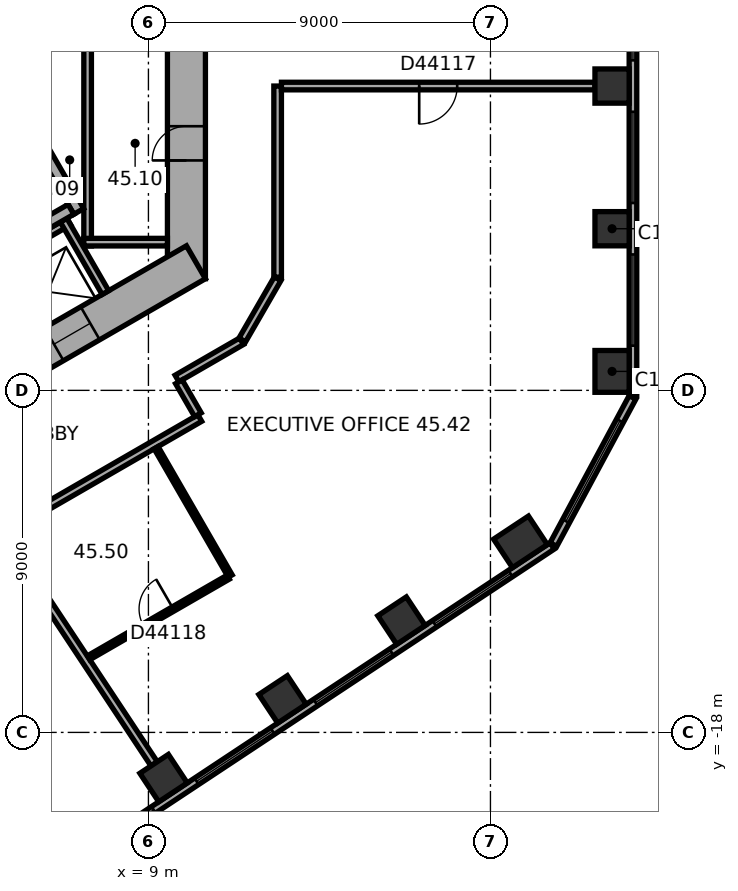
"""IFC4 building model, lengths in metres.
Left out: names, types, materials, properties, quantities, classifications, styles, units other than length and angle.
Written with IfcOpenShell. Run it as: python <this file> out.ifc"""

import sys

from ifc_helpers import new_model, si_unit, direction, frame, frame_2d, origin, origin_2d, place, context, subcontext, project, spatial, rectangle, extrude, element, fill, save


model = new_model("IFC4")
c1 = context("Model", 3, precision=1e-05, world=origin(), true_north=direction((0.0, 1.0)))
c2 = subcontext(c1, "Body", "Model", "MODEL_VIEW")
j1 = project(units=[si_unit("LENGTHUNIT", "METRE"), si_unit("PLANEANGLEUNIT", "RADIAN")], contexts=[c1])
p1 = place(None, origin())
s1 = spatial("IfcSite", under=j1, at=p1, CompositionType="ELEMENT")
p2 = place(p1, origin())
s2 = spatial("IfcBuilding", under=s1, at=p2, CompositionType="ELEMENT")
p3 = place(p2, frame((0.0, 0.0, 183.6)))
s3 = spatial("IfcBuildingStorey", under=s2, at=p3, CompositionType="ELEMENT", Elevation=183.6)
p4 = place(p3, frame((21.2, -8.501, 0.0), z_axis=(0.0, 0.0, 1.0), x_axis=(0.0, 1.0, 0.0)))
e1 = element("IfcColumn", 1, at=p4, inside=s3, PredefinedType="COLUMN", context=c2, shape_type="SweptSolid", body=[
    extrude(rectangle(XDim=1.1, YDim=0.9, at=origin_2d()), origin(), (0.0, 0.0, 1.0), 3.7),
])
for number, where, z_axis, x_axis in (
    (2, (21.2, -4.747, 0.0), (0.0, 0.0, 1.0), (0.0, 1.0, 0.0)),
    (3, (21.2, -0.993, 0.0), (0.0, 0.0, 1.0), (0.0, 1.0, 0.0)),
    (4, (9.398, -19.202, 0.0), (0.0, 0.0, 1.0), (0.834, 0.552, 0.0)),
    (5, (12.529, -17.13, 0.0), (0.0, 0.0, 1.0), (0.834, 0.552, 0.0)),
    (6, (15.659, -15.058, 0.0), (0.0, 0.0, 1.0), (0.834, 0.552, 0.0)),
):
    element("IfcColumn", number, at=place(p3, frame(where, z_axis=z_axis, x_axis=x_axis)), inside=s3, PredefinedType="COLUMN", context=c2, shape_type="SweptSolid", body=[
        extrude(rectangle(XDim=0.9, YDim=0.9, at=origin_2d()), origin(), (0.0, 0.0, 1.0), 3.7),
    ])
p5 = place(p3, frame((18.79, -12.986, 0.0), z_axis=(0.0, 0.0, 1.0), x_axis=(0.833885822067, 0.551936985312, 0.0)))
e7 = element("IfcColumn", 7, at=p5, inside=s3, PredefinedType="COLUMN", context=c2, shape_type="SweptSolid", body=[
    extrude(rectangle(XDim=1.1, YDim=0.9, at=origin_2d()), origin(), (0.0, 0.0, 1.0), 3.7),
])
p6 = place(p3, frame((10.0, -6.062, 0.0), z_axis=(0.0, 0.0, 1.0), x_axis=(0.0, 1.0, 0.0)))
e8 = element("IfcWall", 8, at=p6, inside=s3, PredefinedType="SHEAR", context=c2, shape_type="SweptSolid", body=[
    extrude(rectangle(XDim=12.125, YDim=1.0, at=frame_2d((6.062, 0.0))), origin(), (0.0, 0.0, 1.0), 3.7),
])
p7 = place(p6, frame((6.262, 0.0, 0.0)))
e9 = element("IfcOpeningElement", 9, at=p7, cuts=e8, PredefinedType="OPENING", context=c2, shape_type="SweptSolid", body=[
    extrude(rectangle(XDim=1.5, YDim=2.1, at=frame_2d((0.75, 1.05))), frame((0.0, 0.51, 0.0), z_axis=(0.0, -1.0, 0.0), x_axis=(1.0, 0.0, 0.0)), (0.0, 0.0, 1.0), 1.02),
])
p8 = place(p6, frame((3.112, 0.0, 0.0)))
e10 = element("IfcOpeningElement", 10, at=p8, cuts=e8, PredefinedType="OPENING", context=c2, shape_type="SweptSolid", body=[
    extrude(rectangle(XDim=0.9, YDim=2.1, at=frame_2d((0.45, 1.05))), frame((0.0, 0.51, 0.0), z_axis=(0.0, -1.0, 0.0), x_axis=(1.0, 0.0, 0.0)), (0.0, 0.0, 1.0), 1.02),
])
p9 = place(p3, frame((-0.25, -11.691, 0.0), z_axis=(0.0, 0.0, 1.0), x_axis=(0.866022616891, 0.50000482701, 0.0)))
e11 = element("IfcWall", 11, at=p9, inside=s3, PredefinedType="SHEAR", context=c2, shape_type="SweptSolid", body=[
    extrude(rectangle(XDim=12.125, YDim=1.0, at=frame_2d((6.062, 0.0))), origin(), (0.0, 0.0, 1.0), 3.7),
])
p10 = place(p9, frame((2.612, 0.0, 0.0)))
e12 = element("IfcOpeningElement", 12, at=p10, cuts=e11, PredefinedType="OPENING", context=c2, shape_type="SweptSolid", body=[
    extrude(rectangle(XDim=1.1, YDim=2.1, at=frame_2d((0.55, 1.05))), frame((0.0, 0.51, 0.0), z_axis=(0.0, -1.0, 0.0), x_axis=(1.0, 0.0, 0.0)), (0.0, 0.0, 1.0), 1.02),
])
p11 = place(p9, frame((5.212, 0.0, 0.0)))
e13 = element("IfcOpeningElement", 13, at=p11, cuts=e11, PredefinedType="OPENING", context=c2, shape_type="SweptSolid", body=[
    extrude(rectangle(XDim=1.1, YDim=2.1, at=frame_2d((0.55, 1.05))), frame((0.0, 0.51, 0.0), z_axis=(0.0, -1.0, 0.0), x_axis=(1.0, 0.0, 0.0)), (0.0, 0.0, 1.0), 1.02),
])
p12 = place(p9, frame((7.812, 0.0, 0.0)))
e14 = element("IfcOpeningElement", 14, at=p12, cuts=e11, PredefinedType="OPENING", context=c2, shape_type="SweptSolid", body=[
    extrude(rectangle(XDim=1.1, YDim=2.1, at=frame_2d((0.55, 1.05))), frame((0.0, 0.51, 0.0), z_axis=(0.0, -1.0, 0.0), x_axis=(1.0, 0.0, 0.0)), (0.0, 0.0, 1.0), 1.02),
])
p13 = place(p3, frame((21.75, -9.138, 0.0), z_axis=(0.0, 0.0, 1.0), x_axis=(0.0, 1.0, 0.0)))
e15 = element("IfcWall", 15, at=p13, inside=s3, PredefinedType="STANDARD", context=c2, shape_type="SweptSolid", body=[
    extrude(rectangle(XDim=20.044, YDim=0.2, at=frame_2d((10.022, 0.0))), origin(), (0.0, 0.0, 1.0), 3.7),
])
p14 = place(p13, frame((1.314, 0.0, 0.9)))
e16 = element("IfcOpeningElement", 16, at=p14, cuts=e15, PredefinedType="OPENING", context=c2, shape_type="SweptSolid", body=[
    extrude(rectangle(XDim=2.4, YDim=2.0, at=frame_2d((1.2, 1.0))), frame((0.0, 0.11, 0.0), z_axis=(0.0, -1.0, 0.0), x_axis=(1.0, 0.0, 0.0)), (0.0, 0.0, 1.0), 0.22),
])
p15 = place(p13, frame((5.069, 0.0, 0.9)))
e17 = element("IfcOpeningElement", 17, at=p15, cuts=e15, PredefinedType="OPENING", context=c2, shape_type="SweptSolid", body=[
    extrude(rectangle(XDim=2.4, YDim=2.0, at=frame_2d((1.2, 1.0))), frame((0.0, 0.11, 0.0), z_axis=(0.0, -1.0, 0.0), x_axis=(1.0, 0.0, 0.0)), (0.0, 0.0, 1.0), 0.22),
])
p16 = place(p13, frame((8.823, 0.0, 0.9)))
e18 = element("IfcOpeningElement", 18, at=p16, cuts=e15, PredefinedType="OPENING", context=c2, shape_type="SweptSolid", body=[
    extrude(rectangle(XDim=2.4, YDim=2.0, at=frame_2d((1.2, 1.0))), frame((0.0, 0.11, 0.0), z_axis=(0.0, -1.0, 0.0), x_axis=(1.0, 0.0, 0.0)), (0.0, 0.0, 1.0), 0.22),
])
p17 = place(p13, frame((12.577, 0.0, 0.9)))
e19 = element("IfcOpeningElement", 19, at=p17, cuts=e15, PredefinedType="OPENING", context=c2, shape_type="SweptSolid", body=[
    extrude(rectangle(XDim=2.4, YDim=2.0, at=frame_2d((1.2, 1.0))), frame((0.0, 0.11, 0.0), z_axis=(0.0, -1.0, 0.0), x_axis=(1.0, 0.0, 0.0)), (0.0, 0.0, 1.0), 0.22),
])
p18 = place(p13, frame((16.331, 0.0, 0.9)))
e20 = element("IfcOpeningElement", 20, at=p18, cuts=e15, PredefinedType="OPENING", context=c2, shape_type="SweptSolid", body=[
    extrude(rectangle(XDim=2.4, YDim=2.0, at=frame_2d((1.2, 1.0))), frame((0.0, 0.11, 0.0), z_axis=(0.0, -1.0, 0.0), x_axis=(1.0, 0.0, 0.0)), (0.0, 0.0, 1.0), 0.22),
])
p19 = place(p3, frame((2.911, -24.156, 0.0), z_axis=(0.0, 0.0, 1.0), x_axis=(0.833882163564, 0.551942512668, 0.0)))
e21 = element("IfcWall", 21, at=p19, inside=s3, PredefinedType="STANDARD", context=c2, shape_type="SweptSolid", body=[
    extrude(rectangle(XDim=20.044, YDim=0.2, at=frame_2d((10.022, 0.0))), origin(), (0.0, 0.0, 1.0), 3.7),
])
p20 = place(p19, frame((1.313, 0.0, 0.9)))
e22 = element("IfcOpeningElement", 22, at=p20, cuts=e21, PredefinedType="OPENING", context=c2, shape_type="SweptSolid", body=[
    extrude(rectangle(XDim=2.4, YDim=2.0, at=frame_2d((1.2, 1.0))), frame((0.0, 0.11, 0.0), z_axis=(0.0, -1.0, 0.0), x_axis=(1.0, 0.0, 0.0)), (0.0, 0.0, 1.0), 0.22),
])
p21 = place(p19, frame((5.067, 0.0, 0.9)))
e23 = element("IfcOpeningElement", 23, at=p21, cuts=e21, PredefinedType="OPENING", context=c2, shape_type="SweptSolid", body=[
    extrude(rectangle(XDim=2.4, YDim=2.0, at=frame_2d((1.2, 1.0))), frame((0.0, 0.11, 0.0), z_axis=(0.0, -1.0, 0.0), x_axis=(1.0, 0.0, 0.0)), (0.0, 0.0, 1.0), 0.22),
])
p22 = place(p19, frame((8.821, 0.0, 0.9)))
e24 = element("IfcOpeningElement", 24, at=p22, cuts=e21, PredefinedType="OPENING", context=c2, shape_type="SweptSolid", body=[
    extrude(rectangle(XDim=2.4, YDim=2.0, at=frame_2d((1.2, 1.0))), frame((0.0, 0.11, 0.0), z_axis=(0.0, -1.0, 0.0), x_axis=(1.0, 0.0, 0.0)), (0.0, 0.0, 1.0), 0.22),
])
p23 = place(p19, frame((12.575, 0.0, 0.9)))
e25 = element("IfcOpeningElement", 25, at=p23, cuts=e21, PredefinedType="OPENING", context=c2, shape_type="SweptSolid", body=[
    extrude(rectangle(XDim=2.4, YDim=2.0, at=frame_2d((1.2, 1.0))), frame((0.0, 0.11, 0.0), z_axis=(0.0, -1.0, 0.0), x_axis=(1.0, 0.0, 0.0)), (0.0, 0.0, 1.0), 0.22),
])
p24 = place(p19, frame((16.329, 0.0, 0.9)))
e26 = element("IfcOpeningElement", 26, at=p24, cuts=e21, PredefinedType="OPENING", context=c2, shape_type="SweptSolid", body=[
    extrude(rectangle(XDim=2.4, YDim=2.0, at=frame_2d((1.2, 1.0))), frame((0.0, 0.11, 0.0), z_axis=(0.0, -1.0, 0.0), x_axis=(1.0, 0.0, 0.0)), (0.0, 0.0, 1.0), 0.22),
])
p25 = place(p3, frame((19.658, -13.057, 0.0), z_axis=(0.0, 0.0, 1.0), x_axis=(0.473307879841, 0.880897071672, 0.0)))
e27 = element("IfcWall", 27, at=p25, inside=s3, PredefinedType="STANDARD", context=c2, shape_type="SweptSolid", body=[
    extrude(rectangle(XDim=4.395, YDim=0.2, at=frame_2d((2.197, 0.0))), origin(), (0.0, 0.0, 1.0), 3.7),
])
p26 = place(p25, frame((0.698, 0.0, 0.9)))
e28 = element("IfcOpeningElement", 28, at=p26, cuts=e27, PredefinedType="OPENING", context=c2, shape_type="SweptSolid", body=[
    extrude(rectangle(XDim=3.0, YDim=2.0, at=frame_2d((1.5, 1.0))), frame((0.0, 0.11, 0.0), z_axis=(0.0, -1.0, 0.0), x_axis=(1.0, 0.0, 0.0)), (0.0, 0.0, 1.0), 0.22),
])
p27 = place(p3, frame((7.4, -5.2, 0.0), z_axis=(0.0, 0.0, 1.0), x_axis=(0.0, 1.0, 0.0)))
e29 = element("IfcWall", 29, at=p27, inside=s3, PredefinedType="PARTITIONING", context=c2, shape_type="SweptSolid", body=[
    extrude(rectangle(XDim=5.4, YDim=0.2, at=frame_2d((2.7, 0.0))), origin(), (0.0, 0.0, 1.0), 3.42),
])
p28 = place(p3, frame((7.3, -5.1, 0.0), z_axis=(0.0, 0.0, 1.0), x_axis=(1.0, 0.0, 0.0)))
e30 = element("IfcWall", 30, at=p28, inside=s3, PredefinedType="PARTITIONING", context=c2, shape_type="SweptSolid", body=[
    extrude(rectangle(XDim=2.2, YDim=0.2, at=frame_2d((1.1, 0.0))), origin(), (0.0, 0.0, 1.0), 3.42),
])
p29 = place(p3, frame((-0.024, -8.559, 0.0), z_axis=(0.0, 0.0, 1.0), x_axis=(0.866026010844, 0.49999894854, 0.0)))
e31 = element("IfcWall", 31, at=p29, inside=s3, PredefinedType="PARTITIONING", context=c2, shape_type="SweptSolid", body=[
    extrude(rectangle(XDim=8.0, YDim=0.2, at=frame_2d((4.0, 0.0))), origin(), (0.0, 0.0, 1.0), 3.42),
])
p30 = place(p3, frame((6.768, -4.522, 0.0), z_axis=(0.0, 0.0, 1.0), x_axis=(0.50002983664, -0.866008176907, 0.0)))
e32 = element("IfcWall", 32, at=p30, inside=s3, PredefinedType="PARTITIONING", context=c2, shape_type="SweptSolid", body=[
    extrude(rectangle(XDim=2.2, YDim=0.2, at=frame_2d((1.1, 0.0))), origin(), (0.0, 0.0, 1.0), 3.42),
])
p31 = place(p3, frame((4.816, -0.222, 0.0), z_axis=(0.0, 0.0, 1.0), x_axis=(0.499977259774, -0.866038532462, 0.0)))
e33 = element("IfcWall", 33, at=p31, inside=s3, PredefinedType="SHEAR", context=c2, shape_type="SweptSolid", body=[
    extrude(rectangle(XDim=4.7, YDim=0.3, at=frame_2d((2.35, 0.0))), origin(), (0.0, 0.0, 1.0), 3.42),
])
p32 = place(p3, frame((0.847, -7.767, 0.0), z_axis=(0.0, 0.0, 1.0), x_axis=(0.866027801685, 0.499995846692, 0.0)))
e34 = element("IfcWall", 34, at=p32, inside=s3, PredefinedType="SHEAR", context=c2, shape_type="SweptSolid", body=[
    extrude(rectangle(XDim=7.06, YDim=0.3, at=frame_2d((3.53, 0.0))), origin(), (0.0, 0.0, 1.0), 3.42),
])
p33 = place(p3, frame((5.342, -12.621, 0.0), z_axis=(0.0, 0.0, 1.0), x_axis=(0.866024665123, 0.500001279396, 0.0)))
e35 = element("IfcWall", 35, at=p33, inside=s3, PredefinedType="PARTITIONING", context=c2, shape_type="SweptSolid", body=[
    extrude(rectangle(XDim=5.786, YDim=0.2, at=frame_2d((2.893, 0.0))), origin(), (0.0, 0.0, 1.0), 3.42),
])
p34 = place(p3, frame((9.15, -18.827, 0.0), z_axis=(0.0, 0.0, 1.0), x_axis=(-0.551939801345, 0.833883958169, 0.0)))
e36 = element("IfcWall", 36, at=p34, inside=s3, PredefinedType="PARTITIONING", context=c2, shape_type="SweptSolid", body=[
    extrude(rectangle(XDim=7.192, YDim=0.2, at=frame_2d((3.596, 0.0))), origin(), (0.0, 0.0, 1.0), 2.87),
])
p35 = place(p3, frame((9.202, -10.508, 0.0), z_axis=(0.0, 0.0, 1.0), x_axis=(0.500043961785, -0.866000020948, 0.0)))
e37 = element("IfcWall", 37, at=p35, inside=s3, PredefinedType="PARTITIONING", context=c2, shape_type="SweptSolid", body=[
    extrude(rectangle(XDim=3.9, YDim=0.12, at=frame_2d((1.95, 0.0))), origin(), (0.0, 0.0, 1.0), 3.42),
])
p36 = place(p3, frame((9.752, -8.688, 0.0), z_axis=(0.0, 0.0, 1.0), x_axis=(0.865974105138, 0.500088841337, 0.0)))
e38 = element("IfcWall", 38, at=p36, inside=s3, PredefinedType="PARTITIONING", context=c2, shape_type="SweptSolid", body=[
    extrude(rectangle(XDim=1.961, YDim=0.2, at=frame_2d((0.98, 0.0))), origin(), (0.0, 0.0, 1.0), 3.42),
])
p37 = place(p3, frame((10.302, -9.642, 0.0), z_axis=(0.0, 0.0, 1.0), x_axis=(-0.500074377092, 0.865982457891, 0.0)))
e39 = element("IfcWall", 39, at=p37, inside=s3, PredefinedType="PARTITIONING", context=c2, shape_type="SweptSolid", body=[
    extrude(rectangle(XDim=1.001, YDim=0.2, at=frame_2d((0.5, 0.0))), origin(), (0.0, 0.0, 1.0), 3.42),
])
p38 = place(p3, frame((11.1, -13.915, 0.0), z_axis=(0.0, 0.0, 1.0), x_axis=(-0.866048475386, -0.499960036685, 0.0)))
e40 = element("IfcWall", 40, at=p38, inside=s3, PredefinedType="PARTITIONING", context=c2, shape_type="SweptSolid", body=[
    extrude(rectangle(XDim=4.24, YDim=0.12, at=frame_2d((2.12, 0.0))), origin(), (0.0, 0.0, 1.0), 3.42),
])
p39 = place(p38, frame((1.67, 0.0, 0.0)))
e41 = element("IfcOpeningElement", 41, at=p39, cuts=e40, PredefinedType="OPENING", context=c2, shape_type="SweptSolid", body=[
    extrude(rectangle(XDim=0.9, YDim=2.1, at=frame_2d((0.45, 1.05))), frame((0.0, 0.07, 0.0), z_axis=(0.0, -1.0, 0.0), x_axis=(1.0, 0.0, 0.0)), (0.0, 0.0, 1.0), 0.14),
])
p40 = place(p3, frame((11.47, -7.673, 0.0), z_axis=(0.0, 0.0, 1.0), x_axis=(0.499964847546, 0.866045698112, 0.0)))
e42 = element("IfcWall", 42, at=p40, inside=s3, PredefinedType="PARTITIONING", context=c2, shape_type="SweptSolid", body=[
    extrude(rectangle(XDim=1.86, YDim=0.2, at=frame_2d((0.93, 0.0))), origin(), (0.0, 0.0, 1.0), 3.42),
])
p41 = place(p3, frame((12.4, -6.022, 0.0), z_axis=(0.0, 0.0, 1.0), x_axis=(0.0, 1.0, 0.0)))
e43 = element("IfcWall", 43, at=p41, inside=s3, PredefinedType="PARTITIONING", context=c2, shape_type="SweptSolid", body=[
    extrude(rectangle(XDim=5.029, YDim=0.2, at=frame_2d((2.515, 0.0))), origin(), (0.0, 0.0, 1.0), 3.42),
])
p42 = place(p3, frame((12.5, -0.993, 0.0), z_axis=(0.0, 0.0, 1.0), x_axis=(1.0, 0.0, 0.0)))
e44 = element("IfcWall", 44, at=p42, inside=s3, PredefinedType="PARTITIONING", context=c2, shape_type="SweptSolid", body=[
    extrude(rectangle(XDim=8.25, YDim=0.2, at=frame_2d((4.125, 0.0))), origin(), (0.0, 0.0, 1.0), 2.87),
])
p43 = place(p42, frame((3.625, 0.0, 0.0)))
e45 = element("IfcOpeningElement", 45, at=p43, cuts=e44, PredefinedType="OPENING", context=c2, shape_type="SweptSolid", body=[
    extrude(rectangle(XDim=1.0, YDim=2.1, at=frame_2d((0.5, 1.05))), frame((0.0, 0.11, 0.0), z_axis=(0.0, -1.0, 0.0), x_axis=(1.0, 0.0, 0.0)), (0.0, 0.0, 1.0), 0.22),
])
p44 = place(p14, origin())
e46 = element("IfcWindow", 46, at=p44, inside=s3, PartitioningType="SINGLE_PANEL", PredefinedType="WINDOW", context=c2, shape_type="SweptSolid", body=[
    extrude(rectangle(XDim=2.4, YDim=2.0, at=frame_2d((1.2, 1.0))), frame((0.0, 0.03, 0.0), z_axis=(0.0, -1.0, 0.0), x_axis=(1.0, 0.0, 0.0)), (0.0, 0.0, 1.0), 0.06),
])
fill(e16, e46)
p45 = place(p15, origin())
e47 = element("IfcWindow", 47, at=p45, inside=s3, PartitioningType="SINGLE_PANEL", PredefinedType="WINDOW", context=c2, shape_type="SweptSolid", body=[
    extrude(rectangle(XDim=2.4, YDim=2.0, at=frame_2d((1.2, 1.0))), frame((0.0, 0.03, 0.0), z_axis=(0.0, -1.0, 0.0), x_axis=(1.0, 0.0, 0.0)), (0.0, 0.0, 1.0), 0.06),
])
fill(e17, e47)
p46 = place(p16, origin())
e48 = element("IfcWindow", 48, at=p46, inside=s3, PartitioningType="SINGLE_PANEL", PredefinedType="WINDOW", context=c2, shape_type="SweptSolid", body=[
    extrude(rectangle(XDim=2.4, YDim=2.0, at=frame_2d((1.2, 1.0))), frame((0.0, 0.03, 0.0), z_axis=(0.0, -1.0, 0.0), x_axis=(1.0, 0.0, 0.0)), (0.0, 0.0, 1.0), 0.06),
])
fill(e18, e48)
p47 = place(p21, origin())
e49 = element("IfcWindow", 49, at=p47, inside=s3, PartitioningType="SINGLE_PANEL", PredefinedType="WINDOW", context=c2, shape_type="SweptSolid", body=[
    extrude(rectangle(XDim=2.4, YDim=2.0, at=frame_2d((1.2, 1.0))), frame((0.0, 0.03, 0.0), z_axis=(0.0, -1.0, 0.0), x_axis=(1.0, 0.0, 0.0)), (0.0, 0.0, 1.0), 0.06),
])
fill(e23, e49)
p48 = place(p22, origin())
e50 = element("IfcWindow", 50, at=p48, inside=s3, PartitioningType="SINGLE_PANEL", PredefinedType="WINDOW", context=c2, shape_type="SweptSolid", body=[
    extrude(rectangle(XDim=2.4, YDim=2.0, at=frame_2d((1.2, 1.0))), frame((0.0, 0.03, 0.0), z_axis=(0.0, -1.0, 0.0), x_axis=(1.0, 0.0, 0.0)), (0.0, 0.0, 1.0), 0.06),
])
fill(e24, e50)
p49 = place(p23, origin())
e51 = element("IfcWindow", 51, at=p49, inside=s3, PartitioningType="SINGLE_PANEL", PredefinedType="WINDOW", context=c2, shape_type="SweptSolid", body=[
    extrude(rectangle(XDim=2.4, YDim=2.0, at=frame_2d((1.2, 1.0))), frame((0.0, 0.03, 0.0), z_axis=(0.0, -1.0, 0.0), x_axis=(1.0, 0.0, 0.0)), (0.0, 0.0, 1.0), 0.06),
])
fill(e25, e51)
p50 = place(p24, origin())
e52 = element("IfcWindow", 52, at=p50, inside=s3, PartitioningType="SINGLE_PANEL", PredefinedType="WINDOW", context=c2, shape_type="SweptSolid", body=[
    extrude(rectangle(XDim=2.4, YDim=2.0, at=frame_2d((1.2, 1.0))), frame((0.0, 0.03, 0.0), z_axis=(0.0, -1.0, 0.0), x_axis=(1.0, 0.0, 0.0)), (0.0, 0.0, 1.0), 0.06),
])
fill(e26, e52)
p51 = place(p26, origin())
e53 = element("IfcWindow", 53, at=p51, inside=s3, PartitioningType="SINGLE_PANEL", PredefinedType="WINDOW", context=c2, shape_type="SweptSolid", body=[
    extrude(rectangle(XDim=3.0, YDim=2.0, at=frame_2d((1.5, 1.0))), frame((0.0, 0.03, 0.0), z_axis=(0.0, -1.0, 0.0), x_axis=(1.0, 0.0, 0.0)), (0.0, 0.0, 1.0), 0.06),
])
fill(e28, e53)
p52 = place(p8, origin())
e54 = element("IfcDoor", 54, at=p52, inside=s3, OperationType="SINGLE_SWING_LEFT", PredefinedType="DOOR", context=c2, shape_type="SweptSolid", body=[
    extrude(rectangle(XDim=0.9, YDim=2.1, at=frame_2d((0.45, 1.05))), frame((0.0, 0.025, 0.0), z_axis=(0.0, -1.0, 0.0), x_axis=(1.0, 0.0, 0.0)), (0.0, 0.0, 1.0), 0.05),
])
fill(e10, e54)
p53 = place(p12, origin())
e55 = element("IfcDoor", 55, at=p53, inside=s3, OperationType="DOUBLE_DOOR_SLIDING", PredefinedType="DOOR", context=c2, shape_type="SweptSolid", body=[
    extrude(rectangle(XDim=1.1, YDim=2.1, at=frame_2d((0.55, 1.05))), frame((0.0, 0.025, 0.0), z_axis=(0.0, -1.0, 0.0), x_axis=(1.0, 0.0, 0.0)), (0.0, 0.0, 1.0), 0.05),
])
fill(e14, e55)
p54 = place(p43, origin())
e56 = element("IfcDoor", 56, at=p54, inside=s3, OperationType="SINGLE_SWING_LEFT", PredefinedType="DOOR", context=c2, shape_type="SweptSolid", body=[
    extrude(rectangle(XDim=1.0, YDim=2.1, at=frame_2d((0.5, 1.05))), frame((0.0, 0.025, 0.0), z_axis=(0.0, -1.0, 0.0), x_axis=(1.0, 0.0, 0.0)), (0.0, 0.0, 1.0), 0.05),
])
fill(e45, e56)
p55 = place(p39, origin())
e57 = element("IfcDoor", 57, at=p55, inside=s3, OperationType="SINGLE_SWING_LEFT", PredefinedType="DOOR", context=c2, shape_type="SweptSolid", body=[
    extrude(rectangle(XDim=0.9, YDim=2.1, at=frame_2d((0.45, 1.05))), frame((0.0, 0.025, 0.0), z_axis=(0.0, -1.0, 0.0), x_axis=(1.0, 0.0, 0.0)), (0.0, 0.0, 1.0), 0.05),
])
fill(e41, e57)
save(model, sys.argv[1])
